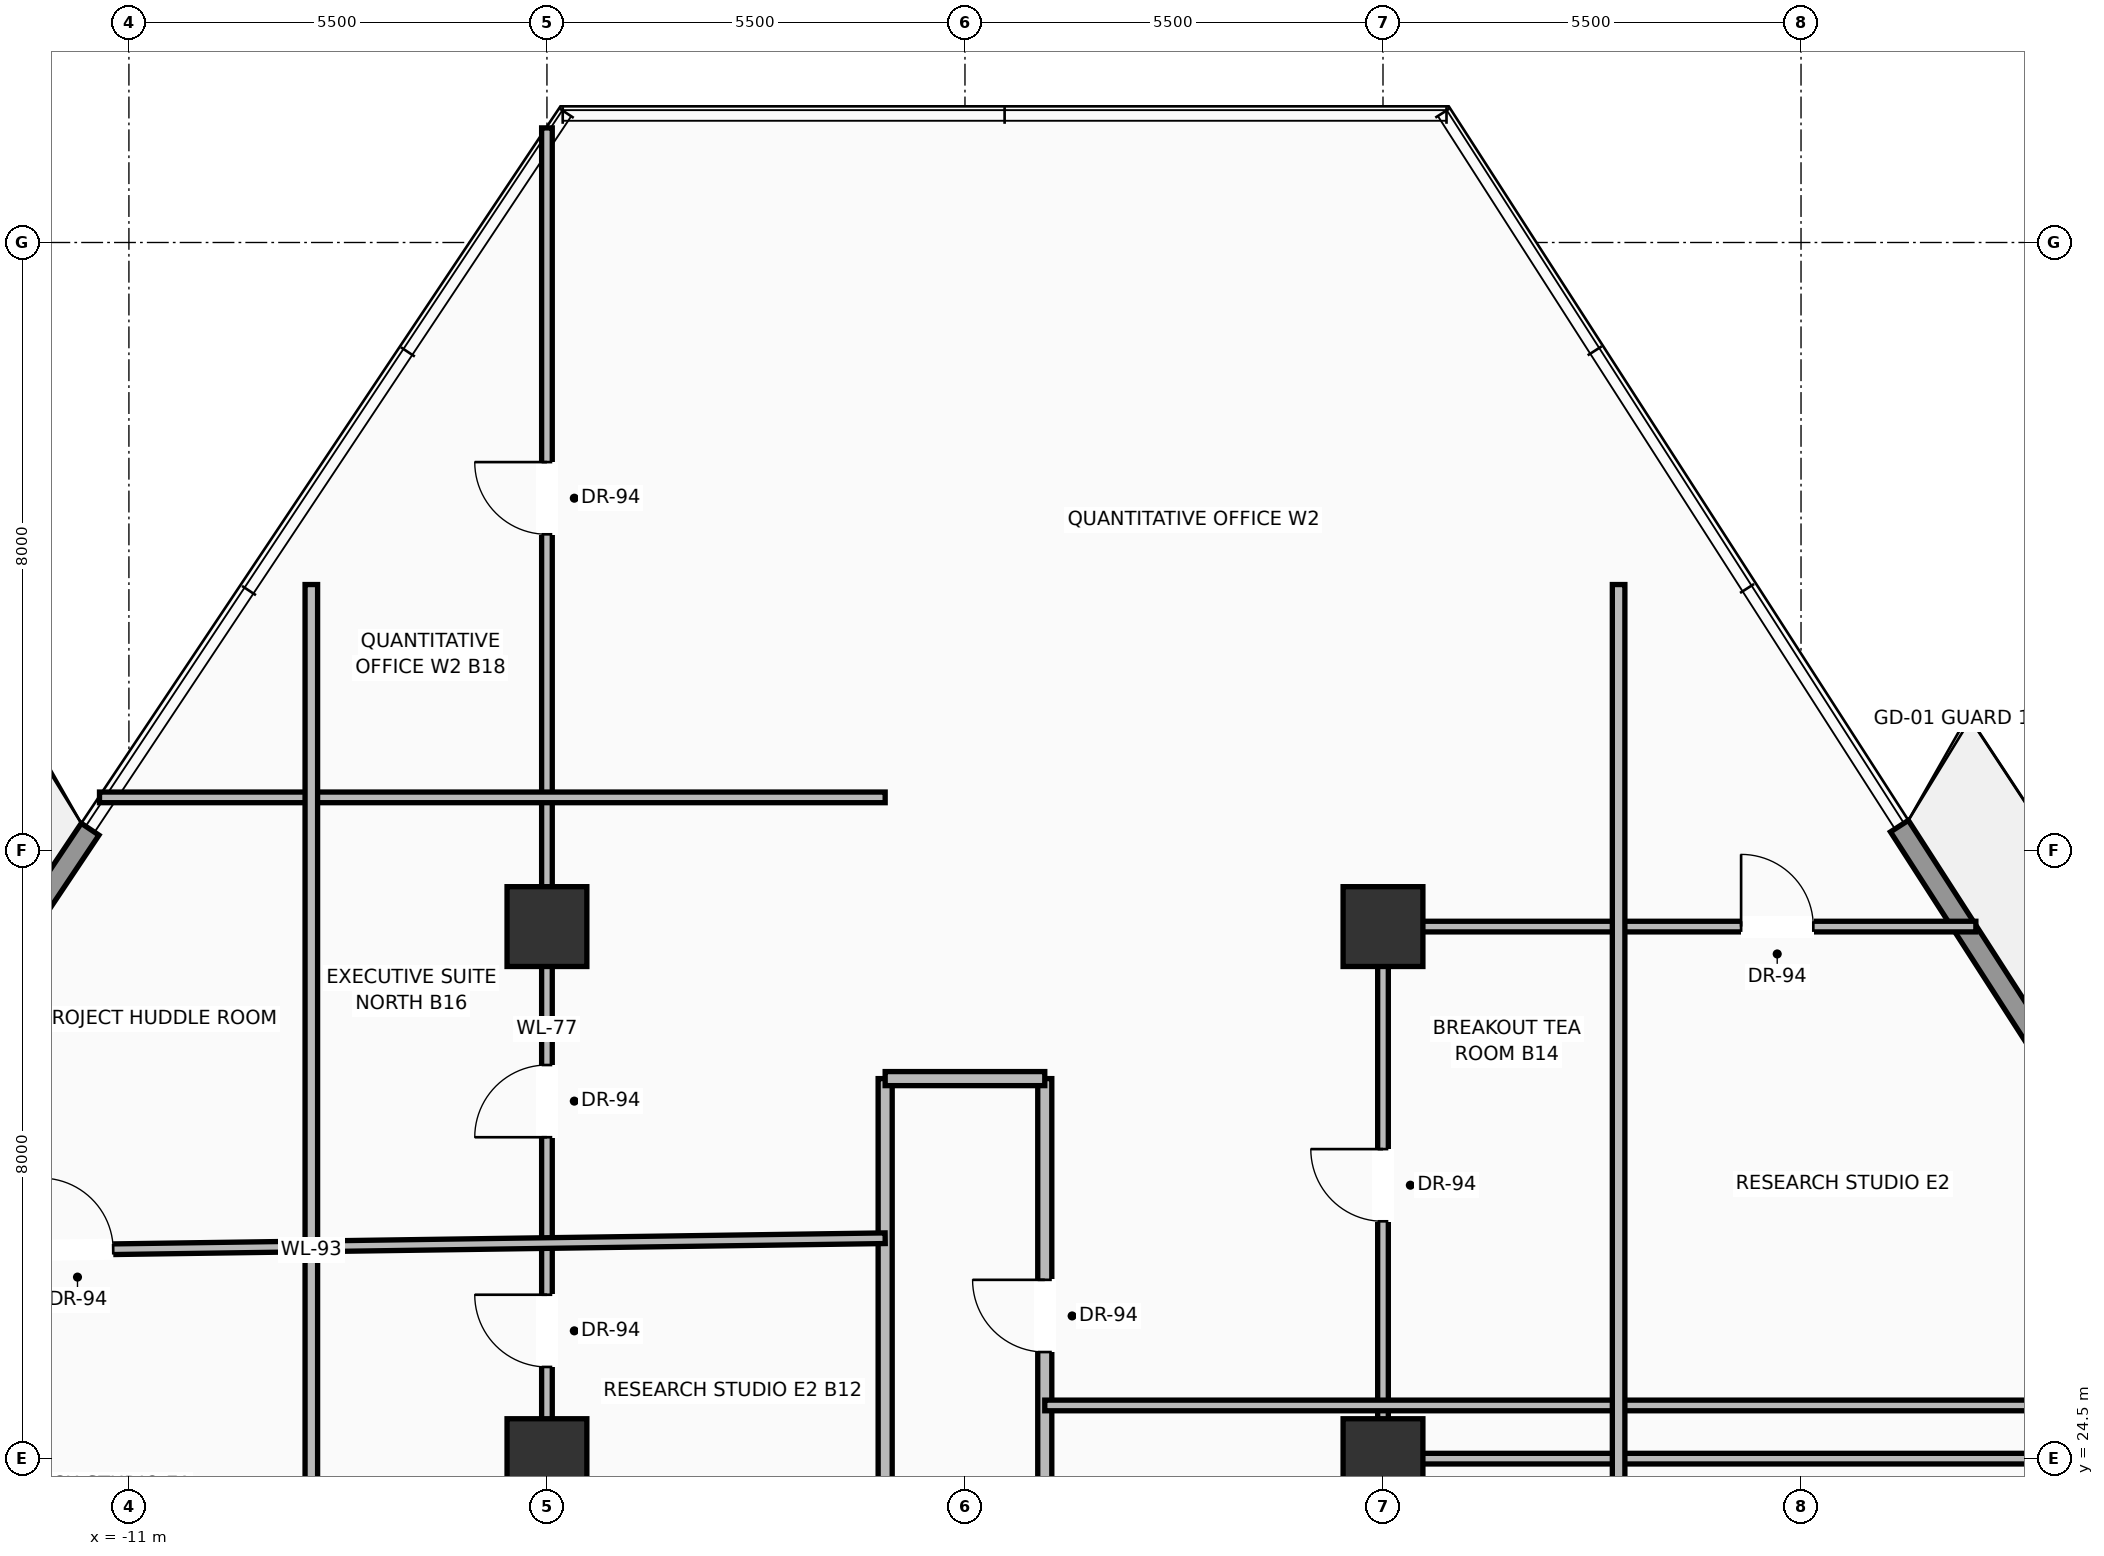
"""IFC4 building model, lengths in metres.
Left out: names, types, materials, properties, quantities, classifications, styles, units other than length and angle.
Written with IfcOpenShell. Run it as: python <this file> out.ifc"""

import sys

from ifc_helpers import new_model, si_unit, direction, frame, frame_2d, origin, origin_2d, place, context, subcontext, project, spatial, rectangle, extrude, source, transform, mapped, element, fill, save


model = new_model("IFC4")
c1 = context("Model", 3, precision=1e-05, world=origin(), true_north=direction((0.0, 1.0)))
c2 = subcontext(c1, "Body", "Model", "MODEL_VIEW")
j1 = project(units=[si_unit("LENGTHUNIT", "METRE"), si_unit("PLANEANGLEUNIT", "RADIAN")], contexts=[c1])
p1 = place(None, origin())
s1 = spatial("IfcSite", under=j1, at=p1, CompositionType="ELEMENT")
p2 = place(p1, origin())
s2 = spatial("IfcBuilding", under=s1, at=p2, CompositionType="ELEMENT")
p3 = place(p2, frame((0.0, 0.0, 106.2)))
s3 = spatial("IfcBuildingStorey", under=s2, at=p3, CompositionType="ELEMENT", Elevation=106.2)
m1 = source(origin(), c2, "Body", "SweptSolid", [
    extrude(rectangle(XDim=1.05, YDim=1.05, at=origin_2d()), origin(), (0.0, 0.0, 1.0), 3.7),
])
for number, where, z_axis, x_axis in (
    (1, (-5.5, 24.5, 0.0), (0.0, 0.0, 1.0), (1.0, 0.0, 0.0)),
    (2, (5.5, 24.5, 0.0), (0.0, 0.0, 1.0), (1.0, 0.0, 0.0)),
    (3, (-5.5, 31.5, 0.0), (0.0, 0.0, 1.0), (1.0, 0.0, 0.0)),
    (4, (5.5, 31.5, 0.0), (0.0, 0.0, 1.0), (1.0, 0.0, 0.0)),
):
    element("IfcColumn", number, at=place(p3, frame(where, z_axis=z_axis, x_axis=x_axis)), inside=s3, PredefinedType="COLUMN", context=c2, shape_type="MappedRepresentation", body=[
        mapped(m1, transform((0.0, 0.0, 0.0), scale=1.0)),
    ])
p4 = place(p3, frame((-21.418, 17.958, 0.0), z_axis=(0.0, 0.0, 1.0), x_axis=(0.555695210114, 0.83138609169, 0.0)))
e5 = element("IfcWall", 5, at=p4, inside=s3, PredefinedType="SOLIDWALL", context=c2, shape_type="SweptSolid", body=[
    extrude(rectangle(XDim=17.829, YDim=0.28, at=frame_2d((8.915, 0.0))), origin(), (0.0, 0.0, 1.0), 3.03),
])
p5 = place(p4, frame((4.279, 0.0, 0.0)))
e6 = element("IfcOpeningElement", 6, at=p5, cuts=e5, PredefinedType="OPENING", context=c2, shape_type="SweptSolid", body=[
    extrude(rectangle(XDim=1.6, YDim=2.35, at=frame_2d((0.8, 1.175))), frame((0.0, 0.15, 0.0), z_axis=(0.0, -1.0, 0.0), x_axis=(1.0, 0.0, 0.0)), (0.0, 0.0, 1.0), 0.3),
])
p6 = place(p4, frame((12.124, 0.0, 0.9)))
e7 = element("IfcOpeningElement", 7, at=p6, cuts=e5, PredefinedType="OPENING", context=c2, shape_type="SweptSolid", body=[
    extrude(rectangle(XDim=2.0, YDim=1.85, at=frame_2d((1.0, 0.925))), frame((0.0, 0.15, 0.0), z_axis=(0.0, -1.0, 0.0), x_axis=(1.0, 0.0, 0.0)), (0.0, 0.0, 1.0), 0.3),
])
p7 = place(p3, frame((12.295, 32.822, 0.0), z_axis=(0.0, 0.0, 1.0), x_axis=(0.54128181568, -0.84084124305, 0.0)))
e8 = element("IfcWall", 8, at=p7, inside=s3, PredefinedType="SOLIDWALL", context=c2, shape_type="SweptSolid", body=[
    extrude(rectangle(XDim=17.556, YDim=0.28, at=frame_2d((8.778, 0.0))), origin(), (0.0, 0.0, 1.0), 3.03),
])
p8 = place(p7, frame((4.213, 0.0, 0.0)))
e9 = element("IfcOpeningElement", 9, at=p8, cuts=e8, PredefinedType="OPENING", context=c2, shape_type="SweptSolid", body=[
    extrude(rectangle(XDim=1.6, YDim=2.35, at=frame_2d((0.8, 1.175))), frame((0.0, 0.15, 0.0), z_axis=(0.0, -1.0, 0.0), x_axis=(1.0, 0.0, 0.0)), (0.0, 0.0, 1.0), 0.3),
])
p9 = place(p7, frame((11.938, 0.0, 0.9)))
e10 = element("IfcOpeningElement", 10, at=p9, cuts=e8, PredefinedType="OPENING", context=c2, shape_type="SweptSolid", body=[
    extrude(rectangle(XDim=2.0, YDim=1.85, at=frame_2d((1.0, 0.925))), frame((0.0, 0.15, 0.0), z_axis=(0.0, -1.0, 0.0), x_axis=(1.0, 0.0, 0.0)), (0.0, 0.0, 1.0), 0.3),
])
p10 = place(p3, frame((-1.05, 18.5, 0.0), z_axis=(0.0, 0.0, 1.0), x_axis=(0.0, 1.0, 0.0)))
e11 = element("IfcWall", 11, at=p10, inside=s3, PredefinedType="PARTITIONING", context=c2, shape_type="SweptSolid", body=[
    extrude(rectangle(XDim=11.0, YDim=0.185, at=frame_2d((5.5, 0.0))), origin(), (0.0, 0.0, 1.0), 2.747),
])
p11 = place(p10, frame((3.58, 0.0, 0.0)))
e12 = element("IfcOpeningElement", 12, at=p11, cuts=e11, PredefinedType="OPENING", context=c2, shape_type="SweptSolid", body=[
    extrude(rectangle(XDim=0.95, YDim=2.2, at=frame_2d((0.475, 1.1))), frame((0.0, 0.103, 0.0), z_axis=(0.0, -1.0, 0.0), x_axis=(1.0, 0.0, 0.0)), (0.0, 0.0, 1.0), 0.205),
])
p12 = place(p3, frame((1.05, 18.5, 0.0), z_axis=(0.0, 0.0, 1.0), x_axis=(0.0, 1.0, 0.0)))
e13 = element("IfcWall", 13, at=p12, inside=s3, PredefinedType="PARTITIONING", context=c2, shape_type="SweptSolid", body=[
    extrude(rectangle(XDim=11.0, YDim=0.185, at=frame_2d((5.5, 0.0))), origin(), (0.0, 0.0, 1.0), 2.747),
])
p13 = place(p12, frame((7.403, 0.0, 0.0)))
e14 = element("IfcOpeningElement", 14, at=p13, cuts=e13, PredefinedType="OPENING", context=c2, shape_type="SweptSolid", body=[
    extrude(rectangle(XDim=0.95, YDim=2.2, at=frame_2d((0.475, 1.1))), frame((0.0, 0.103, 0.0), z_axis=(0.0, -1.0, 0.0), x_axis=(1.0, 0.0, 0.0)), (0.0, 0.0, 1.0), 0.205),
])
p14 = place(p3, frame((-1.05, 29.5, 0.0), z_axis=(0.0, 0.0, 1.0), x_axis=(1.0, 0.0, 0.0)))
e15 = element("IfcWall", 15, at=p14, inside=s3, PredefinedType="PARTITIONING", context=c2, shape_type="SweptSolid", body=[
    extrude(rectangle(XDim=2.1, YDim=0.185, at=frame_2d((1.05, 0.0))), origin(), (0.0, 0.0, 1.0), 3.442),
])
p15 = place(p3, frame((-5.5, 18.3, 0.0), z_axis=(0.0, 0.0, 1.0), x_axis=(0.0, 1.0, 0.0)))
e16 = element("IfcWall", 16, at=p15, inside=s3, PredefinedType="PARTITIONING", context=c2, shape_type="SweptSolid", body=[
    extrude(rectangle(XDim=23.708, YDim=0.14, at=frame_2d((11.854, 0.0))), origin(), (0.0, 0.0, 1.0), 2.747),
])
p16 = place(p15, frame((7.406, 0.0, 0.0)))
e17 = element("IfcOpeningElement", 17, at=p16, cuts=e16, PredefinedType="OPENING", context=c2, shape_type="SweptSolid", body=[
    extrude(rectangle(XDim=0.95, YDim=2.2, at=frame_2d((0.475, 1.1))), frame((0.0, 0.08, 0.0), z_axis=(0.0, -1.0, 0.0), x_axis=(1.0, 0.0, 0.0)), (0.0, 0.0, 1.0), 0.16),
])
p17 = place(p15, frame((10.429, 0.0, 0.0)))
e18 = element("IfcOpeningElement", 18, at=p17, cuts=e16, PredefinedType="OPENING", context=c2, shape_type="SweptSolid", body=[
    extrude(rectangle(XDim=0.95, YDim=2.2, at=frame_2d((0.475, 1.1))), frame((0.0, 0.08, 0.0), z_axis=(0.0, -1.0, 0.0), x_axis=(1.0, 0.0, 0.0)), (0.0, 0.0, 1.0), 0.16),
])
p18 = place(p15, frame((18.361, 0.0, 0.0)))
e19 = element("IfcOpeningElement", 19, at=p18, cuts=e16, PredefinedType="OPENING", context=c2, shape_type="SweptSolid", body=[
    extrude(rectangle(XDim=0.95, YDim=2.2, at=frame_2d((0.475, 1.1))), frame((0.0, 0.08, 0.0), z_axis=(0.0, -1.0, 0.0), x_axis=(1.0, 0.0, 0.0)), (0.0, 0.0, 1.0), 0.16),
])
p19 = place(p3, frame((5.5, 24.5, 0.0), z_axis=(0.0, 0.0, 1.0), x_axis=(1.0, 0.0, 0.0)))
e20 = element("IfcWall", 20, at=p19, inside=s3, PredefinedType="PARTITIONING", context=c2, shape_type="SweptSolid", body=[
    extrude(rectangle(XDim=12.306, YDim=0.14, at=frame_2d((6.153, 0.0))), origin(), (0.0, 0.0, 1.0), 2.747),
])
p20 = place(p3, frame((5.5, 24.5, 0.0), z_axis=(0.0, 0.0, 1.0), x_axis=(0.0, 1.0, 0.0)))
e21 = element("IfcWall", 21, at=p20, inside=s3, PredefinedType="PARTITIONING", context=c2, shape_type="SweptSolid", body=[
    extrude(rectangle(XDim=7.0, YDim=0.14, at=frame_2d((3.5, 0.0))), origin(), (0.0, 0.0, 1.0), 2.747),
])
p21 = place(p20, frame((3.123, 0.0, 0.0)))
e22 = element("IfcOpeningElement", 22, at=p21, cuts=e21, PredefinedType="OPENING", context=c2, shape_type="SweptSolid", body=[
    extrude(rectangle(XDim=0.95, YDim=2.2, at=frame_2d((0.475, 1.1))), frame((0.0, 0.08, 0.0), z_axis=(0.0, -1.0, 0.0), x_axis=(1.0, 0.0, 0.0)), (0.0, 0.0, 1.0), 0.16),
])
p22 = place(p3, frame((5.5, 31.5, 0.0), z_axis=(0.0, 0.0, 1.0), x_axis=(1.0, 0.0, 0.0)))
e23 = element("IfcWall", 23, at=p22, inside=s3, PredefinedType="PARTITIONING", context=c2, shape_type="SweptSolid", body=[
    extrude(rectangle(XDim=7.8, YDim=0.14, at=frame_2d((3.9, 0.0))), origin(), (0.0, 0.0, 1.0), 2.747),
])
p23 = place(p22, frame((4.712, 0.0, 0.0)))
e24 = element("IfcOpeningElement", 24, at=p23, cuts=e23, PredefinedType="OPENING", context=c2, shape_type="SweptSolid", body=[
    extrude(rectangle(XDim=0.95, YDim=2.2, at=frame_2d((0.475, 1.1))), frame((0.0, 0.08, 0.0), z_axis=(0.0, -1.0, 0.0), x_axis=(1.0, 0.0, 0.0)), (0.0, 0.0, 1.0), 0.16),
])
p24 = place(p3, frame((-15.4, 27.196, 0.0), z_axis=(0.0, 0.0, 1.0), x_axis=(0.999898629756, 0.014238336023, 0.0)))
e25 = element("IfcWall", 25, at=p24, inside=s3, PredefinedType="PARTITIONING", context=c2, shape_type="SweptSolid", body=[
    extrude(rectangle(XDim=14.352, YDim=0.14, at=frame_2d((7.176, 0.0))), origin(), (0.0, 0.0, 1.0), 2.747),
])
p25 = place(p24, frame((3.244, 0.0, 0.0)))
e26 = element("IfcOpeningElement", 26, at=p25, cuts=e25, PredefinedType="OPENING", context=c2, shape_type="SweptSolid", body=[
    extrude(rectangle(XDim=0.95, YDim=2.2, at=frame_2d((0.475, 1.1))), frame((0.0, 0.08, 0.0), z_axis=(0.0, -1.0, 0.0), x_axis=(1.0, 0.0, 0.0)), (0.0, 0.0, 1.0), 0.16),
])
p26 = place(p3, frame((-11.387, 33.2, 0.0), z_axis=(0.0, 0.0, 1.0), x_axis=(1.0, 0.0, 0.0)))
e27 = element("IfcWall", 27, at=p26, inside=s3, PredefinedType="PARTITIONING", context=c2, shape_type="SweptSolid", body=[
    extrude(rectangle(XDim=10.337, YDim=0.14, at=frame_2d((5.168, 0.0))), origin(), (0.0, 0.0, 1.0), 2.747),
])
p27 = place(p3, frame((1.05, 25.2, 0.0), z_axis=(0.0, 0.0, 1.0), x_axis=(1.0, 0.0, 0.0)))
e28 = element("IfcWall", 28, at=p27, inside=s3, PredefinedType="PARTITIONING", context=c2, shape_type="SweptSolid", body=[
    extrude(rectangle(XDim=16.306, YDim=0.14, at=frame_2d((8.153, 0.0))), origin(), (0.0, 0.0, 1.0), 2.747),
])
for number, where, z_axis, x_axis in (
    (29, (-8.6, 18.5, 0.0), (0.0, 0.0, 1.0), (0.0, 1.0, 0.0)),
    (30, (8.6, 18.5, 0.0), (0.0, 0.0, 1.0), (0.0, 1.0, 0.0)),
):
    element("IfcWall", number, at=place(p3, frame(where, z_axis=z_axis, x_axis=x_axis)), inside=s3, PredefinedType="PARTITIONING", context=c2, shape_type="SweptSolid", body=[
        extrude(rectangle(XDim=17.5, YDim=0.165, at=frame_2d((8.75, 0.0))), origin(), (0.0, 0.0, 1.0), 2.747),
    ])
m2 = source(origin(), c2, "Body", "SweptSolid", [
    extrude(rectangle(XDim=0.95, YDim=2.2, at=frame_2d((0.475, 1.1))), frame((0.0, 0.025, 0.0), z_axis=(0.0, -1.0, 0.0), x_axis=(1.0, 0.0, 0.0)), (0.0, 0.0, 1.0), 0.05),
])
p28 = place(p13, origin())
e31 = element("IfcDoor", 31, at=p28, inside=s3, OperationType="SINGLE_SWING_RIGHT", PredefinedType="DOOR", context=c2, shape_type="MappedRepresentation", body=[
    mapped(m2, transform((0.0, 0.0, 0.0), scale=1.0)),
])
fill(e14, e31)
p29 = place(p16, origin())
e32 = element("IfcDoor", 32, at=p29, inside=s3, OperationType="SINGLE_SWING_RIGHT", PredefinedType="DOOR", context=c2, shape_type="MappedRepresentation", body=[
    mapped(m2, transform((0.0, 0.0, 0.0), scale=1.0)),
])
fill(e17, e32)
p30 = place(p23, origin())
e33 = element("IfcDoor", 33, at=p30, inside=s3, OperationType="SINGLE_SWING_LEFT", PredefinedType="DOOR", context=c2, shape_type="MappedRepresentation", body=[
    mapped(m2, transform((0.0, 0.0, 0.0), scale=1.0)),
])
fill(e24, e33)
p31 = place(p21, origin())
e34 = element("IfcDoor", 34, at=p31, inside=s3, OperationType="SINGLE_SWING_RIGHT", PredefinedType="DOOR", context=c2, shape_type="MappedRepresentation", body=[
    mapped(m2, transform((0.0, 0.0, 0.0), scale=1.0)),
])
fill(e22, e34)
p32 = place(p17, origin())
e35 = element("IfcDoor", 35, at=p32, inside=s3, OperationType="SINGLE_SWING_LEFT", PredefinedType="DOOR", context=c2, shape_type="MappedRepresentation", body=[
    mapped(m2, transform((0.0, 0.0, 0.0), scale=1.0)),
])
fill(e18, e35)
p33 = place(p18, origin())
e36 = element("IfcDoor", 36, at=p33, inside=s3, OperationType="SINGLE_SWING_RIGHT", PredefinedType="DOOR", context=c2, shape_type="MappedRepresentation", body=[
    mapped(m2, transform((0.0, 0.0, 0.0), scale=1.0)),
])
fill(e19, e36)
p34 = place(p25, origin())
e37 = element("IfcDoor", 37, at=p34, inside=s3, OperationType="SINGLE_SWING_LEFT", PredefinedType="DOOR", context=c2, shape_type="MappedRepresentation", body=[
    mapped(m2, transform((0.0, 0.0, 0.0), scale=1.0)),
])
fill(e26, e37)
save(model, sys.argv[1])
